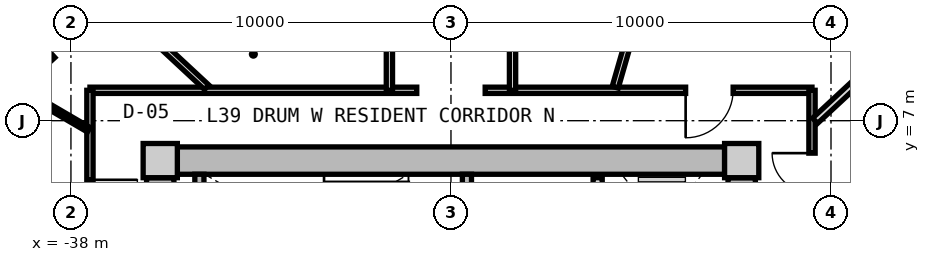
"""IFC4 building model, lengths in metres.
Left out: names, types, materials, properties, quantities, classifications, styles, units other than length and angle.
Written with IfcOpenShell. Run it as: python <this file> out.ifc"""

import sys

from ifc_helpers import new_model, si_unit, direction, frame, frame_2d, origin, origin_2d, place, context, subcontext, project, spatial, rectangle, extrude, source, transform, mapped, element, fill, save


model = new_model("IFC4")
c1 = context("Model", 3, precision=1e-05, world=origin(), true_north=direction((0.0, 1.0)))
c2 = subcontext(c1, "Body", "Model", "MODEL_VIEW")
j1 = project(units=[si_unit("LENGTHUNIT", "METRE"), si_unit("PLANEANGLEUNIT", "RADIAN")], contexts=[c1])
p1 = place(None, origin())
s1 = spatial("IfcSite", under=j1, at=p1, CompositionType="ELEMENT")
p2 = place(p1, origin())
s2 = spatial("IfcBuilding", under=s1, at=p2, CompositionType="ELEMENT")
p3 = place(p2, frame((0.0, 0.0, 126.75)))
s3 = spatial("IfcBuildingStorey", under=s2, at=p3, CompositionType="ELEMENT", Elevation=126.75)
m1 = source(origin(), c2, "Body", "SweptSolid", [
    extrude(rectangle(XDim=0.9, YDim=0.9, at=origin_2d()), origin(), (0.0, 0.0, 1.0), 3.05),
])
for number, where, z_axis, x_axis in (
    (1, (-20.35, 5.95, 0.0), (0.0, 0.0, 1.0), (1.0, 0.0, 0.0)),
    (2, (-35.65, 5.95, 0.0), (0.0, 0.0, 1.0), (1.0, 0.0, 0.0)),
):
    element("IfcColumn", number, at=place(p3, frame(where, z_axis=z_axis, x_axis=x_axis)), inside=s3, PredefinedType="COLUMN", context=c2, shape_type="MappedRepresentation", body=[
        mapped(m1, transform((0.0, 0.0, 0.0), x_axis=(1.0, 0.0, 0.0), y_axis=(0.0, 1.0, 0.0), z_axis=(0.0, 0.0, 1.0), scale=1.0)),
    ])
m2 = source(origin(), c2, "Body", "SweptSolid", [
    extrude(rectangle(XDim=14.4, YDim=0.72, at=frame_2d((7.2, 0.0))), origin(), (0.0, 0.0, 1.0), 2.73),
])
p4 = place(p3, frame((-35.2, 5.95, 0.0), z_axis=(0.0, 0.0, 1.0), x_axis=(1.0, 0.0, 0.0)))
e3 = element("IfcWall", 3, at=p4, inside=s3, PredefinedType="SHEAR", context=c2, shape_type="MappedRepresentation", body=[
    mapped(m2, transform((0.0, 0.0, 0.0), x_axis=(1.0, 0.0, 0.0), y_axis=(0.0, 1.0, 0.0), z_axis=(0.0, 0.0, 1.0), scale=1.0)),
])
m3 = source(origin(), c2, "Body", "SweptSolid", [
    extrude(rectangle(XDim=11.0, YDim=0.72, at=frame_2d((5.5, 0.0))), origin(), (0.0, 0.0, 1.0), 2.73),
])
p5 = place(p3, frame((-35.65, -5.5, 0.0), z_axis=(0.0, 0.0, 1.0), x_axis=(0.0, 1.0, 0.0)))
e4 = element("IfcWall", 4, at=p5, inside=s3, PredefinedType="SHEAR", context=c2, shape_type="MappedRepresentation", body=[
    mapped(m3, transform((0.0, 0.0, 0.0), x_axis=(1.0, 0.0, 0.0), y_axis=(0.0, 1.0, 0.0), z_axis=(0.0, 0.0, 1.0), scale=1.0)),
])
p6 = place(p5, frame((3.8, 0.0, 0.0)))
e5 = element("IfcOpeningElement", 5, at=p6, cuts=e4, PredefinedType="OPENING", context=c2, shape_type="SweptSolid", body=[
    extrude(rectangle(XDim=1.2, YDim=2.15, at=frame_2d((0.6, 1.075))), frame((0.0, 0.37, 0.0), z_axis=(0.0, -1.0, 0.0), x_axis=(1.0, 0.0, 0.0)), (0.0, 0.0, 1.0), 0.74),
])
p7 = place(p3, frame((-20.35, 5.5, 0.0), z_axis=(0.0, 0.0, 1.0), x_axis=(0.0, -1.0, 0.0)))
e6 = element("IfcWall", 6, at=p7, inside=s3, PredefinedType="SHEAR", context=c2, shape_type="MappedRepresentation", body=[
    mapped(m3, transform((0.0, 0.0, 0.0), x_axis=(1.0, 0.0, 0.0), y_axis=(0.0, 1.0, 0.0), z_axis=(0.0, 0.0, 1.0), scale=1.0)),
])
p8 = place(p7, frame((5.65, 0.0, 0.0)))
e7 = element("IfcOpeningElement", 7, at=p8, cuts=e6, PredefinedType="OPENING", context=c2, shape_type="SweptSolid", body=[
    extrude(rectangle(XDim=1.2, YDim=2.15, at=frame_2d((0.6, 1.075))), frame((0.0, 0.37, 0.0), z_axis=(0.0, -1.0, 0.0), x_axis=(1.0, 0.0, 0.0)), (0.0, 0.0, 1.0), 0.74),
])
m4 = source(origin(), c2, "Body", "SweptSolid", [
    extrude(rectangle(XDim=3.14, YDim=0.24, at=frame_2d((1.57, 0.0))), origin(), (0.0, 0.0, 1.0), 2.73),
])
p9 = place(p3, frame((-34.62, 2.45, 0.0), z_axis=(0.0, 0.0, 1.0), x_axis=(0.0, 1.0, 0.0)))
e8 = element("IfcWall", 8, at=p9, inside=s3, PredefinedType="PARTITIONING", context=c2, shape_type="MappedRepresentation", body=[
    mapped(m4, transform((0.0, 0.0, 0.0), x_axis=(1.0, 0.0, 0.0), y_axis=(0.0, 1.0, 0.0), z_axis=(0.0, 0.0, 1.0), scale=1.0)),
])
p10 = place(p3, frame((-27.58, 2.45, 0.0), z_axis=(0.0, 0.0, 1.0), x_axis=(0.0, 1.0, 0.0)))
e9 = element("IfcWall", 9, at=p10, inside=s3, PredefinedType="PARTITIONING", context=c2, shape_type="MappedRepresentation", body=[
    mapped(m4, transform((0.0, 0.0, 0.0), x_axis=(1.0, 0.0, 0.0), y_axis=(0.0, 1.0, 0.0), z_axis=(0.0, 0.0, 1.0), scale=1.0)),
])
p11 = place(p10, frame((0.55, 0.0, 0.0)))
e10 = element("IfcOpeningElement", 10, at=p11, cuts=e9, PredefinedType="OPENING", context=c2, shape_type="SweptSolid", body=[
    extrude(rectangle(XDim=1.1, YDim=2.15, at=frame_2d((0.55, 1.075))), frame((0.0, 0.13, 0.0), z_axis=(0.0, -1.0, 0.0), x_axis=(1.0, 0.0, 0.0)), (0.0, 0.0, 1.0), 0.26),
])
m5 = source(origin(), c2, "Body", "SweptSolid", [
    extrude(rectangle(XDim=5.0, YDim=0.24, at=frame_2d((2.5, 0.0))), origin(), (0.0, 0.0, 1.0), 2.715),
])
p12 = place(p3, frame((-24.14, 0.5, 0.0), z_axis=(0.0, 0.0, 1.0), x_axis=(0.0, 1.0, 0.0)))
e11 = element("IfcWall", 11, at=p12, inside=s3, PredefinedType="PARTITIONING", context=c2, shape_type="MappedRepresentation", body=[
    mapped(m5, transform((0.0, 0.0, 0.0), x_axis=(1.0, 0.0, 0.0), y_axis=(0.0, 1.0, 0.0), z_axis=(0.0, 0.0, 1.0), scale=1.0)),
])
p13 = place(p12, frame((3.05, 0.0, 0.0)))
e12 = element("IfcOpeningElement", 12, at=p13, cuts=e11, PredefinedType="OPENING", context=c2, shape_type="SweptSolid", body=[
    extrude(rectangle(XDim=1.3, YDim=2.2, at=frame_2d((0.65, 1.1))), frame((0.0, 0.13, 0.0), z_axis=(0.0, -1.0, 0.0), x_axis=(1.0, 0.0, 0.0)), (0.0, 0.0, 1.0), 0.26),
])
p14 = place(p12, frame((0.55, 0.0, 0.0)))
e13 = element("IfcOpeningElement", 13, at=p14, cuts=e11, PredefinedType="OPENING", context=c2, shape_type="SweptSolid", body=[
    extrude(rectangle(XDim=1.3, YDim=2.2, at=frame_2d((0.65, 1.1))), frame((0.0, 0.13, 0.0), z_axis=(0.0, -1.0, 0.0), x_axis=(1.0, 0.0, 0.0)), (0.0, 0.0, 1.0), 0.26),
])
m6 = source(origin(), c2, "Body", "SweptSolid", [
    extrude(rectangle(XDim=8.6, YDim=0.165, at=frame_2d((4.3, 0.0))), origin(), (0.0, 0.0, 1.0), 2.715),
])
p15 = place(p3, frame((-37.5, 7.8, 0.0), z_axis=(0.0, 0.0, 1.0), x_axis=(1.0, 0.0, 0.0)))
e14 = element("IfcWall", 14, at=p15, inside=s3, PredefinedType="PARTITIONING", context=c2, shape_type="MappedRepresentation", body=[
    mapped(m6, transform((0.0, 0.0, 0.0), x_axis=(1.0, 0.0, 0.0), y_axis=(0.0, 1.0, 0.0), z_axis=(0.0, 0.0, 1.0), scale=1.0)),
])
p16 = place(p3, frame((-27.1, 7.8, 0.0), z_axis=(0.0, 0.0, 1.0), x_axis=(1.0, 0.0, 0.0)))
e15 = element("IfcWall", 15, at=p16, inside=s3, PredefinedType="PARTITIONING", context=c2, shape_type="MappedRepresentation", body=[
    mapped(m6, transform((0.0, 0.0, 0.0), x_axis=(1.0, 0.0, 0.0), y_axis=(0.0, 1.0, 0.0), z_axis=(0.0, 0.0, 1.0), scale=1.0)),
])
p17 = place(p16, frame((5.275, 0.0, 0.0)))
e16 = element("IfcOpeningElement", 16, at=p17, cuts=e15, PredefinedType="OPENING", context=c2, shape_type="SweptSolid", body=[
    extrude(rectangle(XDim=1.25, YDim=2.2, at=frame_2d((0.625, 1.1))), frame((0.0, 0.093, 0.0), z_axis=(0.0, -1.0, 0.0), x_axis=(1.0, 0.0, 0.0)), (0.0, 0.0, 1.0), 0.185),
])
m7 = source(origin(), c2, "Body", "SweptSolid", [
    extrude(rectangle(XDim=15.6, YDim=0.165, at=frame_2d((7.8, 0.0))), origin(), (0.0, 0.0, 1.0), 2.715),
])
p18 = place(p3, frame((-37.5, -7.8, 0.0), z_axis=(0.0, 0.0, 1.0), x_axis=(0.0, 1.0, 0.0)))
e17 = element("IfcWall", 17, at=p18, inside=s3, PredefinedType="PARTITIONING", context=c2, shape_type="MappedRepresentation", body=[
    mapped(m7, transform((0.0, 0.0, 0.0), x_axis=(1.0, 0.0, 0.0), y_axis=(0.0, 1.0, 0.0), z_axis=(0.0, 0.0, 1.0), scale=1.0)),
])
p19 = place(p18, frame((11.994, 0.0, 0.0)))
e18 = element("IfcOpeningElement", 18, at=p19, cuts=e17, PredefinedType="OPENING", context=c2, shape_type="SweptSolid", body=[
    extrude(rectangle(XDim=1.25, YDim=2.2, at=frame_2d((0.625, 1.1))), frame((0.0, 0.093, 0.0), z_axis=(0.0, -1.0, 0.0), x_axis=(1.0, 0.0, 0.0)), (0.0, 0.0, 1.0), 0.185),
])
p20 = place(p18, frame((7.984, 0.0, 0.0)))
e19 = element("IfcOpeningElement", 19, at=p20, cuts=e17, PredefinedType="OPENING", context=c2, shape_type="SweptSolid", body=[
    extrude(rectangle(XDim=1.05, YDim=2.15, at=frame_2d((0.525, 1.075))), frame((0.0, 0.093, 0.0), z_axis=(0.0, -1.0, 0.0), x_axis=(1.0, 0.0, 0.0)), (0.0, 0.0, 1.0), 0.185),
])
p21 = place(p18, frame((5.777, 0.0, 0.0)))
e20 = element("IfcOpeningElement", 20, at=p21, cuts=e17, PredefinedType="OPENING", context=c2, shape_type="SweptSolid", body=[
    extrude(rectangle(XDim=1.05, YDim=2.15, at=frame_2d((0.525, 1.075))), frame((0.0, 0.093, 0.0), z_axis=(0.0, -1.0, 0.0), x_axis=(1.0, 0.0, 0.0)), (0.0, 0.0, 1.0), 0.185),
])
p22 = place(p18, frame((2.676, 0.0, 0.0)))
e21 = element("IfcOpeningElement", 21, at=p22, cuts=e17, PredefinedType="OPENING", context=c2, shape_type="SweptSolid", body=[
    extrude(rectangle(XDim=1.05, YDim=2.15, at=frame_2d((0.525, 1.075))), frame((0.0, 0.093, 0.0), z_axis=(0.0, -1.0, 0.0), x_axis=(1.0, 0.0, 0.0)), (0.0, 0.0, 1.0), 0.185),
])
p23 = place(p3, frame((-18.5, 7.8, 0.0), z_axis=(0.0, 0.0, 1.0), x_axis=(0.0, -1.0, 0.0)))
e22 = element("IfcWall", 22, at=p23, inside=s3, PredefinedType="PARTITIONING", context=c2, shape_type="MappedRepresentation", body=[
    mapped(m7, transform((0.0, 0.0, 0.0), x_axis=(1.0, 0.0, 0.0), y_axis=(0.0, 1.0, 0.0), z_axis=(0.0, 0.0, 1.0), scale=1.0)),
])
p24 = place(p23, frame((12.002, 0.0, 0.0)))
e23 = element("IfcOpeningElement", 23, at=p24, cuts=e22, PredefinedType="OPENING", context=c2, shape_type="SweptSolid", body=[
    extrude(rectangle(XDim=1.05, YDim=2.15, at=frame_2d((0.525, 1.075))), frame((0.0, 0.093, 0.0), z_axis=(0.0, -1.0, 0.0), x_axis=(1.0, 0.0, 0.0)), (0.0, 0.0, 1.0), 0.185),
])
p25 = place(p23, frame((10.211, 0.0, 0.0)))
e24 = element("IfcOpeningElement", 24, at=p25, cuts=e22, PredefinedType="OPENING", context=c2, shape_type="SweptSolid", body=[
    extrude(rectangle(XDim=1.05, YDim=2.15, at=frame_2d((0.525, 1.075))), frame((0.0, 0.093, 0.0), z_axis=(0.0, -1.0, 0.0), x_axis=(1.0, 0.0, 0.0)), (0.0, 0.0, 1.0), 0.185),
])
p26 = place(p23, frame((7.722, 0.0, 0.0)))
e25 = element("IfcOpeningElement", 25, at=p26, cuts=e22, PredefinedType="OPENING", context=c2, shape_type="SweptSolid", body=[
    extrude(rectangle(XDim=1.05, YDim=2.15, at=frame_2d((0.525, 1.075))), frame((0.0, 0.093, 0.0), z_axis=(0.0, -1.0, 0.0), x_axis=(1.0, 0.0, 0.0)), (0.0, 0.0, 1.0), 0.185),
])
p27 = place(p23, frame((6.291, 0.0, 0.0)))
e26 = element("IfcOpeningElement", 26, at=p27, cuts=e22, PredefinedType="OPENING", context=c2, shape_type="SweptSolid", body=[
    extrude(rectangle(XDim=1.05, YDim=2.15, at=frame_2d((0.525, 1.075))), frame((0.0, 0.093, 0.0), z_axis=(0.0, -1.0, 0.0), x_axis=(1.0, 0.0, 0.0)), (0.0, 0.0, 1.0), 0.185),
])
p28 = place(p23, frame((4.296, 0.0, 0.0)))
e27 = element("IfcOpeningElement", 27, at=p28, cuts=e22, PredefinedType="OPENING", context=c2, shape_type="SweptSolid", body=[
    extrude(rectangle(XDim=1.05, YDim=2.15, at=frame_2d((0.525, 1.075))), frame((0.0, 0.093, 0.0), z_axis=(0.0, -1.0, 0.0), x_axis=(1.0, 0.0, 0.0)), (0.0, 0.0, 1.0), 0.185),
])
p29 = place(p23, frame((1.654, 0.0, 0.0)))
e28 = element("IfcOpeningElement", 28, at=p29, cuts=e22, PredefinedType="OPENING", context=c2, shape_type="SweptSolid", body=[
    extrude(rectangle(XDim=1.05, YDim=2.15, at=frame_2d((0.525, 1.075))), frame((0.0, 0.093, 0.0), z_axis=(0.0, -1.0, 0.0), x_axis=(1.0, 0.0, 0.0)), (0.0, 0.0, 1.0), 0.185),
])
m8 = source(origin(), c2, "Body", "SweptSolid", [
    extrude(rectangle(XDim=8.989, YDim=0.165, at=frame_2d((4.495, 0.0))), origin(), (0.0, 0.0, 1.0), 2.215),
])
p30 = place(p3, frame((-23.678, 7.88, 0.0), z_axis=(0.0, 0.0, 1.0), x_axis=(0.27702323008, 0.960863221274, 0.0)))
e29 = element("IfcWall", 29, at=p30, inside=s3, PredefinedType="PARTITIONING", context=c2, shape_type="MappedRepresentation", body=[
    mapped(m8, transform((0.0, 0.0, 0.0), x_axis=(1.0, 0.0, 0.0), y_axis=(0.0, 1.0, 0.0), z_axis=(0.0, 0.0, 1.0), scale=1.0)),
])
m9 = source(origin(), c2, "Body", "SweptSolid", [
    extrude(rectangle(XDim=6.187, YDim=0.165, at=frame_2d((3.093, 0.0))), origin(), (0.0, 0.0, 1.0), 2.215),
])
p31 = place(p3, frame((-34.429, 7.88, 0.0), z_axis=(0.0, 0.0, 1.0), x_axis=(-0.732501077882, 0.680765870841, 0.0)))
e30 = element("IfcWall", 30, at=p31, inside=s3, PredefinedType="PARTITIONING", context=c2, shape_type="MappedRepresentation", body=[
    mapped(m9, transform((0.0, 0.0, 0.0), x_axis=(1.0, 0.0, 0.0), y_axis=(0.0, 1.0, 0.0), z_axis=(0.0, 0.0, 1.0), scale=1.0)),
])
m10 = source(origin(), c2, "Body", "SweptSolid", [
    extrude(rectangle(XDim=6.99, YDim=0.165, at=frame_2d((3.495, 0.0))), origin(), (0.0, 0.0, 1.0), 2.215),
])
p32 = place(p3, frame((-29.62, 7.8, 0.0), z_axis=(0.0, 0.0, 1.0), x_axis=(0.0, 1.0, 0.0)))
e31 = element("IfcWall", 31, at=p32, inside=s3, PredefinedType="PARTITIONING", context=c2, shape_type="MappedRepresentation", body=[
    mapped(m10, transform((0.0, 0.0, 0.0), x_axis=(1.0, 0.0, 0.0), y_axis=(0.0, 1.0, 0.0), z_axis=(0.0, 0.0, 1.0), scale=1.0)),
])
p33 = place(p32, frame((2.97, 0.0, 0.0)))
e32 = element("IfcOpeningElement", 32, at=p33, cuts=e31, PredefinedType="OPENING", context=c2, shape_type="SweptSolid", body=[
    extrude(rectangle(XDim=1.05, YDim=2.15, at=frame_2d((0.525, 1.075))), frame((0.0, 0.093, 0.0), z_axis=(0.0, -1.0, 0.0), x_axis=(1.0, 0.0, 0.0)), (0.0, 0.0, 1.0), 0.185),
])
m11 = source(origin(), c2, "Body", "SweptSolid", [
    extrude(rectangle(XDim=6.99, YDim=0.165, at=frame_2d((3.495, 0.0))), origin(), (0.0, 0.0, 1.0), 2.715),
])
p34 = place(p3, frame((-26.38, 7.8, 0.0), z_axis=(0.0, 0.0, 1.0), x_axis=(0.0, 1.0, 0.0)))
e33 = element("IfcWall", 33, at=p34, inside=s3, PredefinedType="PARTITIONING", context=c2, shape_type="MappedRepresentation", body=[
    mapped(m11, transform((0.0, 0.0, 0.0), x_axis=(1.0, 0.0, 0.0), y_axis=(0.0, 1.0, 0.0), z_axis=(0.0, 0.0, 1.0), scale=1.0)),
])
p35 = place(p34, frame((2.97, 0.0, 0.0)))
e34 = element("IfcOpeningElement", 34, at=p35, cuts=e33, PredefinedType="OPENING", context=c2, shape_type="SweptSolid", body=[
    extrude(rectangle(XDim=1.05, YDim=2.15, at=frame_2d((0.525, 1.075))), frame((0.0, 0.093, 0.0), z_axis=(0.0, -1.0, 0.0), x_axis=(1.0, 0.0, 0.0)), (0.0, 0.0, 1.0), 0.185),
])
m12 = source(origin(), c2, "Body", "SweptSolid", [
    extrude(rectangle(XDim=2.172, YDim=0.14, at=frame_2d((1.086, 0.0))), origin(), (0.0, 0.0, 1.0), 2.715),
])
p36 = place(p3, frame((-37.53, 6.762, 0.0), z_axis=(0.0, 0.0, 1.0), x_axis=(-0.863562702562, 0.504241468688, 0.0)))
e35 = element("IfcWall", 35, at=p36, inside=s3, PredefinedType="PARTITIONING", context=c2, shape_type="MappedRepresentation", body=[
    mapped(m12, transform((0.0, 0.0, 0.0), x_axis=(1.0, 0.0, 0.0), y_axis=(0.0, 1.0, 0.0), z_axis=(0.0, 0.0, 1.0), scale=1.0)),
])
m13 = source(origin(), c2, "Body", "SweptSolid", [
    extrude(rectangle(XDim=3.457, YDim=0.14, at=frame_2d((1.729, 0.0))), origin(), (0.0, 0.0, 1.0), 2.715),
])
p37 = place(p3, frame((-39.405, 7.857, 0.0), z_axis=(0.0, 0.0, 1.0), x_axis=(0.737567375492, 0.675273549467, 0.0)))
e36 = element("IfcWall", 36, at=p37, inside=s3, PredefinedType="PARTITIONING", context=c2, shape_type="MappedRepresentation", body=[
    mapped(m13, transform((0.0, 0.0, 0.0), x_axis=(1.0, 0.0, 0.0), y_axis=(0.0, 1.0, 0.0), z_axis=(0.0, 0.0, 1.0), scale=1.0)),
])
p38 = place(p37, frame((1.268, 0.0, 0.0)))
e37 = element("IfcOpeningElement", 37, at=p38, cuts=e36, PredefinedType="OPENING", context=c2, shape_type="SweptSolid", body=[
    extrude(rectangle(XDim=0.92, YDim=2.1, at=frame_2d((0.46, 1.05))), frame((0.0, 0.08, 0.0), z_axis=(0.0, -1.0, 0.0), x_axis=(1.0, 0.0, 0.0)), (0.0, 0.0, 1.0), 0.16),
])
m14 = source(origin(), c2, "Body", "SweptSolid", [
    extrude(rectangle(XDim=7.482, YDim=0.19, at=frame_2d((3.741, 0.0))), origin(), (0.0, 0.0, 1.0), 2.215),
])
p39 = place(p3, frame((-18.42, 6.998, 0.0), z_axis=(0.0, 0.0, 1.0), x_axis=(0.732508698043, 0.680757671489, 0.0)))
e38 = element("IfcWall", 38, at=p39, inside=s3, PredefinedType="PARTITIONING", context=c2, shape_type="MappedRepresentation", body=[
    mapped(m14, transform((0.0, 0.0, 0.0), x_axis=(1.0, 0.0, 0.0), y_axis=(0.0, 1.0, 0.0), z_axis=(0.0, 0.0, 1.0), scale=1.0)),
])
m15 = source(origin(), c2, "Body", "SweptSolid", [
    extrude(rectangle(XDim=8.968, YDim=0.19, at=frame_2d((4.484, 0.0))), origin(), (0.0, 0.0, 1.0), 2.715),
])
p40 = place(p3, frame((-18.47, 4.036, 0.0), z_axis=(0.0, 0.0, 1.0), x_axis=(0.882202936563, 0.47086938605, 0.0)))
e39 = element("IfcWall", 39, at=p40, inside=s3, PredefinedType="PARTITIONING", context=c2, shape_type="MappedRepresentation", body=[
    mapped(m15, transform((0.0, 0.0, 0.0), x_axis=(1.0, 0.0, 0.0), y_axis=(0.0, 1.0, 0.0), z_axis=(0.0, 0.0, 1.0), scale=1.0)),
])
m16 = source(origin(), c2, "Body", "SweptSolid", [
    extrude(rectangle(XDim=1.25, YDim=2.2, at=frame_2d((0.625, 1.1))), frame((0.0, 0.025, 0.0), z_axis=(0.0, -1.0, 0.0), x_axis=(1.0, 0.0, 0.0)), (0.0, 0.0, 1.0), 0.05),
])
p41 = place(p19, frame((1.25, 0.0, 0.0), z_axis=(0.0, 0.0, 1.0), x_axis=(-1.0, 0.0, 0.0)))
e40 = element("IfcDoor", 40, at=p41, inside=s3, OperationType="SINGLE_SWING_LEFT", PredefinedType="DOOR", context=c2, shape_type="MappedRepresentation", body=[
    mapped(m16, transform((0.0, 0.0, 0.0), x_axis=(1.0, 0.0, 0.0), y_axis=(0.0, 1.0, 0.0), z_axis=(0.0, 0.0, 1.0), scale=1.0)),
])
fill(e18, e40)
m17 = source(origin(), c2, "Body", "SweptSolid", [
    extrude(rectangle(XDim=0.92, YDim=2.1, at=frame_2d((0.46, 1.05))), frame((0.0, 0.025, 0.0), z_axis=(0.0, -1.0, 0.0), x_axis=(1.0, 0.0, 0.0)), (0.0, 0.0, 1.0), 0.05),
])
p42 = place(p38, origin())
e41 = element("IfcDoor", 41, at=p42, inside=s3, OperationType="SINGLE_SWING_RIGHT", PredefinedType="DOOR", context=c2, shape_type="MappedRepresentation", body=[
    mapped(m17, transform((0.0, 0.0, 0.0), x_axis=(1.0, 0.0, 0.0), y_axis=(0.0, 1.0, 0.0), z_axis=(0.0, 0.0, 1.0), scale=1.0)),
])
fill(e37, e41)
m18 = source(origin(), c2, "Body", "SweptSolid", [
    extrude(rectangle(XDim=1.05, YDim=2.15, at=frame_2d((0.525, 1.075))), frame((0.0, 0.025, 0.0), z_axis=(0.0, -1.0, 0.0), x_axis=(1.0, 0.0, 0.0)), (0.0, 0.0, 1.0), 0.05),
])
p43 = place(p29, frame((1.05, 0.0, 0.0), z_axis=(0.0, 0.0, 1.0), x_axis=(-1.0, 0.0, 0.0)))
e42 = element("IfcDoor", 42, at=p43, inside=s3, OperationType="SINGLE_SWING_RIGHT", PredefinedType="DOOR", context=c2, shape_type="MappedRepresentation", body=[
    mapped(m18, transform((0.0, 0.0, 0.0), x_axis=(1.0, 0.0, 0.0), y_axis=(0.0, 1.0, 0.0), z_axis=(0.0, 0.0, 1.0), scale=1.0)),
])
fill(e28, e42)
p44 = place(p17, frame((1.25, 0.0, 0.0), z_axis=(0.0, 0.0, 1.0), x_axis=(-1.0, 0.0, 0.0)))
e43 = element("IfcDoor", 43, at=p44, inside=s3, OperationType="SINGLE_SWING_RIGHT", PredefinedType="DOOR", context=c2, shape_type="MappedRepresentation", body=[
    mapped(m16, transform((0.0, 0.0, 0.0), x_axis=(1.0, 0.0, 0.0), y_axis=(0.0, 1.0, 0.0), z_axis=(0.0, 0.0, 1.0), scale=1.0)),
])
fill(e16, e43)
save(model, sys.argv[1])
